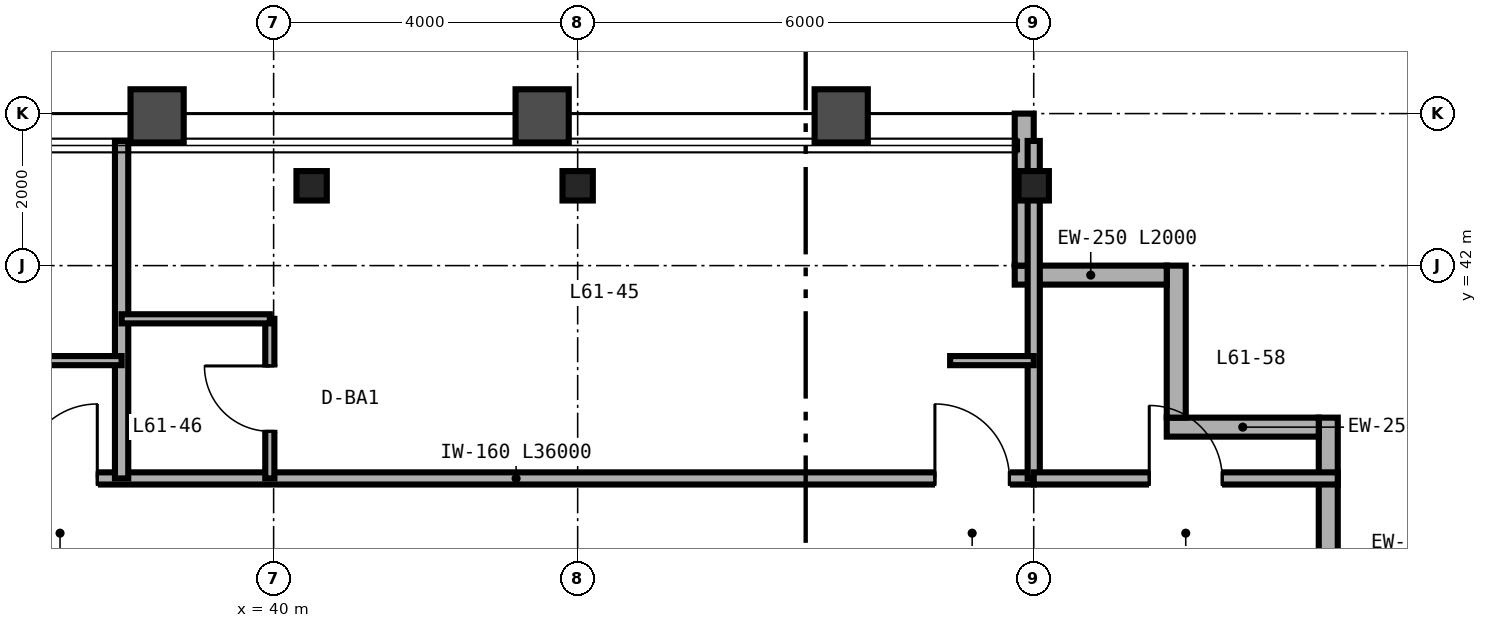
"""IFC4 building model, lengths in metres.
Left out: names, types, materials, properties, quantities, classifications, styles, units other than length and angle.
Written with IfcOpenShell. Run it as: python <this file> out.ifc"""

import sys

from ifc_helpers import new_model, si_unit, direction, frame, frame_2d, origin, origin_2d, place, context, subcontext, project, spatial, rectangle, i_section, extrude, source, transform, mapped, element, fill, save


model = new_model("IFC4")
c1 = context("Model", 3, precision=1e-05, world=origin(), true_north=direction((0.0, 1.0)))
c2 = subcontext(c1, "Body", "Model", "MODEL_VIEW")
j1 = project(units=[si_unit("LENGTHUNIT", "METRE"), si_unit("PLANEANGLEUNIT", "RADIAN")], contexts=[c1])
p1 = place(None, origin())
s1 = spatial("IfcSite", under=j1, at=p1, CompositionType="ELEMENT")
p2 = place(p1, origin())
s2 = spatial("IfcBuilding", under=s1, at=p2, CompositionType="ELEMENT")
p3 = place(p2, frame((0.0, 0.0, 243.6)))
s3 = spatial("IfcBuildingStorey", under=s2, at=p3, CompositionType="ELEMENT", Elevation=243.6)
m1 = source(origin(), c2, "Body", "SweptSolid", [
    extrude(i_section(OverallWidth=0.399, OverallDepth=0.387, WebThickness=0.021, FlangeThickness=0.033, FilletRadius=0.025, at=origin_2d()), origin(), (0.0, 0.0, 1.0), 3.28),
])
for number, where, z_axis, x_axis in (
    (1, (40.5, 43.05, 0.0), (0.0, 0.0, 1.0), (1.0, 0.0, 0.0)),
    (2, (44.0, 43.05, 0.0), (0.0, 0.0, 1.0), (1.0, 0.0, 0.0)),
    (3, (50.0, 43.05, 0.0), (0.0, 0.0, 1.0), (1.0, 0.0, 0.0)),
):
    element("IfcColumn", number, at=place(p3, frame(where, z_axis=z_axis, x_axis=x_axis)), inside=s3, PredefinedType="COLUMN", context=c2, shape_type="MappedRepresentation", body=[
        mapped(m1, transform((0.0, 0.0, 0.0), scale=1.0)),
    ])
for number, where, z_axis, x_axis in (
    (4, (53.875, 38.0, 0.0), (0.0, 0.0, 1.0), (0.0, 1.0, 0.0)),
    (5, (53.75, 39.875, 0.0), (0.0, 0.0, 1.0), (-1.0, 0.0, 0.0)),
    (6, (51.875, 40.0, 0.0), (0.0, 0.0, 1.0), (0.0, 1.0, 0.0)),
    (7, (51.75, 41.875, 0.0), (0.0, 0.0, 1.0), (-1.0, 0.0, 0.0)),
):
    element("IfcWall", number, at=place(p3, frame(where, z_axis=z_axis, x_axis=x_axis)), inside=s3, PredefinedType="SOLIDWALL", context=c2, shape_type="SweptSolid", body=[
        extrude(rectangle(XDim=2.0, YDim=0.25, at=frame_2d((1.0, 0.0))), origin(), (0.0, 0.0, 1.0), 3.28),
    ])
p4 = place(p3, frame((49.875, 42.0, 0.0), z_axis=(0.0, 0.0, 1.0), x_axis=(0.0, 1.0, 0.0)))
e8 = element("IfcWall", 8, at=p4, inside=s3, PredefinedType="SOLIDWALL", context=c2, shape_type="SweptSolid", body=[
    extrude(rectangle(XDim=2.0, YDim=0.25, at=frame_2d((1.0, 0.0))), origin(), (0.0, 0.0, 1.0), 2.587),
])
p5 = place(p3, frame((14.0, 39.2, 0.0), z_axis=(0.0, 0.0, 1.0), x_axis=(1.0, 0.0, 0.0)))
e9 = element("IfcWall", 9, at=p5, inside=s3, PredefinedType="PARTITIONING", context=c2, shape_type="SweptSolid", body=[
    extrude(rectangle(XDim=36.0, YDim=0.16, at=frame_2d((18.0, 0.0))), origin(), (0.0, 0.0, 1.0), 2.823),
])
p6 = place(p5, frame((10.7, 0.0, 0.0)))
e10 = element("IfcOpeningElement", 10, at=p6, cuts=e9, PredefinedType="OPENING", context=c2, shape_type="SweptSolid", body=[
    extrude(rectangle(XDim=0.98, YDim=2.2, at=frame_2d((0.49, 1.1))), frame((0.0, 0.09, 0.0), z_axis=(0.0, -1.0, 0.0), x_axis=(1.0, 0.0, 0.0)), (0.0, 0.0, 1.0), 0.18),
])
p7 = place(p5, frame((22.7, 0.0, 0.0)))
e11 = element("IfcOpeningElement", 11, at=p7, cuts=e9, PredefinedType="OPENING", context=c2, shape_type="SweptSolid", body=[
    extrude(rectangle(XDim=0.98, YDim=2.2, at=frame_2d((0.49, 1.1))), frame((0.0, 0.09, 0.0), z_axis=(0.0, -1.0, 0.0), x_axis=(1.0, 0.0, 0.0)), (0.0, 0.0, 1.0), 0.18),
])
p8 = place(p5, frame((34.7, 0.0, 0.0)))
e12 = element("IfcOpeningElement", 12, at=p8, cuts=e9, PredefinedType="OPENING", context=c2, shape_type="SweptSolid", body=[
    extrude(rectangle(XDim=0.98, YDim=2.2, at=frame_2d((0.49, 1.1))), frame((0.0, 0.09, 0.0), z_axis=(0.0, -1.0, 0.0), x_axis=(1.0, 0.0, 0.0)), (0.0, 0.0, 1.0), 0.18),
])
p9 = place(p3, frame((50.0, 39.2, 0.0), z_axis=(0.0, 0.0, 1.0), x_axis=(0.0, 1.0, 0.0)))
e13 = element("IfcWall", 13, at=p9, inside=s3, PredefinedType="PARTITIONING", context=c2, shape_type="SweptSolid", body=[
    extrude(rectangle(XDim=4.44, YDim=0.16, at=frame_2d((2.22, 0.0))), origin(), (0.0, 0.0, 1.0), 2.587),
])
p10 = place(p3, frame((38.0, 39.2, 0.0), z_axis=(0.0, 0.0, 1.0), x_axis=(0.0, 1.0, 0.0)))
e14 = element("IfcWall", 14, at=p10, inside=s3, PredefinedType="PARTITIONING", context=c2, shape_type="SweptSolid", body=[
    extrude(rectangle(XDim=4.44, YDim=0.175, at=frame_2d((2.22, 0.0))), origin(), (0.0, 0.0, 1.0), 2.36),
])
p11 = place(p3, frame((36.9, 40.75, 0.0), z_axis=(0.0, 0.0, 1.0), x_axis=(1.0, 0.0, 0.0)))
e15 = element("IfcWall", 15, at=p11, inside=s3, PredefinedType="PARTITIONING", context=c2, shape_type="SweptSolid", body=[
    extrude(rectangle(XDim=1.1, YDim=0.12, at=frame_2d((0.55, 0.0))), origin(), (0.0, 0.0, 1.0), 3.28),
])
p12 = place(p3, frame((39.95, 39.2, 0.0), z_axis=(0.0, 0.0, 1.0), x_axis=(0.0, 1.0, 0.0)))
e16 = element("IfcWall", 16, at=p12, inside=s3, PredefinedType="PARTITIONING", context=c2, shape_type="SweptSolid", body=[
    extrude(rectangle(XDim=2.1, YDim=0.12, at=frame_2d((1.05, 0.0))), origin(), (0.0, 0.0, 1.0), 3.28),
])
p13 = place(p12, frame((0.62, 0.0, 0.0)))
e17 = element("IfcOpeningElement", 17, at=p13, cuts=e16, PredefinedType="OPENING", context=c2, shape_type="SweptSolid", body=[
    extrude(rectangle(XDim=0.86, YDim=2.1, at=frame_2d((0.43, 1.05))), frame((0.0, 0.07, 0.0), z_axis=(0.0, -1.0, 0.0), x_axis=(1.0, 0.0, 0.0)), (0.0, 0.0, 1.0), 0.14),
])
p14 = place(p3, frame((38.0, 41.3, 0.0), z_axis=(0.0, 0.0, 1.0), x_axis=(1.0, 0.0, 0.0)))
e18 = element("IfcWall", 18, at=p14, inside=s3, PredefinedType="PARTITIONING", context=c2, shape_type="SweptSolid", body=[
    extrude(rectangle(XDim=1.95, YDim=0.12, at=frame_2d((0.975, 0.0))), origin(), (0.0, 0.0, 1.0), 3.28),
])
p15 = place(p3, frame((48.9, 40.75, 0.0), z_axis=(0.0, 0.0, 1.0), x_axis=(1.0, 0.0, 0.0)))
e19 = element("IfcWall", 19, at=p15, inside=s3, PredefinedType="PARTITIONING", context=c2, shape_type="SweptSolid", body=[
    extrude(rectangle(XDim=1.1, YDim=0.12, at=frame_2d((0.55, 0.0))), origin(), (0.0, 0.0, 1.0), 3.28),
])
p16 = place(p3, frame((50.0, 39.2, 0.0), z_axis=(0.0, 0.0, 1.0), x_axis=(1.0, 0.0, 0.0)))
e20 = element("IfcWall", 20, at=p16, inside=s3, PredefinedType="PARTITIONING", context=c2, shape_type="SweptSolid", body=[
    extrude(rectangle(XDim=4.0, YDim=0.16, at=frame_2d((2.0, 0.0))), origin(), (0.0, 0.0, 1.0), 3.28),
])
p17 = place(p16, frame((1.52, 0.0, 0.0)))
e21 = element("IfcOpeningElement", 21, at=p17, cuts=e20, PredefinedType="OPENING", context=c2, shape_type="SweptSolid", body=[
    extrude(rectangle(XDim=0.96, YDim=2.15, at=frame_2d((0.48, 1.075))), frame((0.0, 0.09, 0.0), z_axis=(0.0, -1.0, 0.0), x_axis=(1.0, 0.0, 0.0)), (0.0, 0.0, 1.0), 0.18),
])
m2 = source(origin(), c2, "Body", "SweptSolid", [
    extrude(rectangle(XDim=0.86, YDim=2.1, at=frame_2d((0.43, 1.05))), frame((0.0, 0.025, 0.0), z_axis=(0.0, -1.0, 0.0), x_axis=(1.0, 0.0, 0.0)), (0.0, 0.0, 1.0), 0.05),
])
p18 = place(p13, origin())
e22 = element("IfcDoor", 22, at=p18, inside=s3, OperationType="SINGLE_SWING_RIGHT", PredefinedType="DOOR", context=c2, shape_type="MappedRepresentation", body=[
    mapped(m2, transform((0.0, 0.0, 0.0), scale=1.0)),
])
fill(e17, e22)
m3 = source(origin(), c2, "Body", "SweptSolid", [
    extrude(rectangle(XDim=0.98, YDim=2.2, at=frame_2d((0.49, 1.1))), frame((0.0, 0.025, 0.0), z_axis=(0.0, -1.0, 0.0), x_axis=(1.0, 0.0, 0.0)), (0.0, 0.0, 1.0), 0.05),
])
p19 = place(p7, origin())
e23 = element("IfcDoor", 23, at=p19, inside=s3, OperationType="SINGLE_SWING_RIGHT", PredefinedType="DOOR", context=c2, shape_type="MappedRepresentation", body=[
    mapped(m3, transform((0.0, 0.0, 0.0), scale=1.0)),
])
fill(e11, e23)
p20 = place(p8, origin())
e24 = element("IfcDoor", 24, at=p20, inside=s3, OperationType="SINGLE_SWING_LEFT", PredefinedType="DOOR", context=c2, shape_type="MappedRepresentation", body=[
    mapped(m3, transform((0.0, 0.0, 0.0), scale=1.0)),
])
fill(e12, e24)
m4 = source(origin(), c2, "Body", "SweptSolid", [
    extrude(rectangle(XDim=0.96, YDim=2.15, at=frame_2d((0.48, 1.075))), frame((0.0, 0.025, 0.0), z_axis=(0.0, -1.0, 0.0), x_axis=(1.0, 0.0, 0.0)), (0.0, 0.0, 1.0), 0.05),
])
p21 = place(p17, origin())
e25 = element("IfcDoor", 25, at=p21, inside=s3, OperationType="SINGLE_SWING_LEFT", PredefinedType="DOOR", context=c2, shape_type="MappedRepresentation", body=[
    mapped(m4, transform((0.0, 0.0, 0.0), scale=1.0)),
])
fill(e21, e25)
save(model, sys.argv[1])
